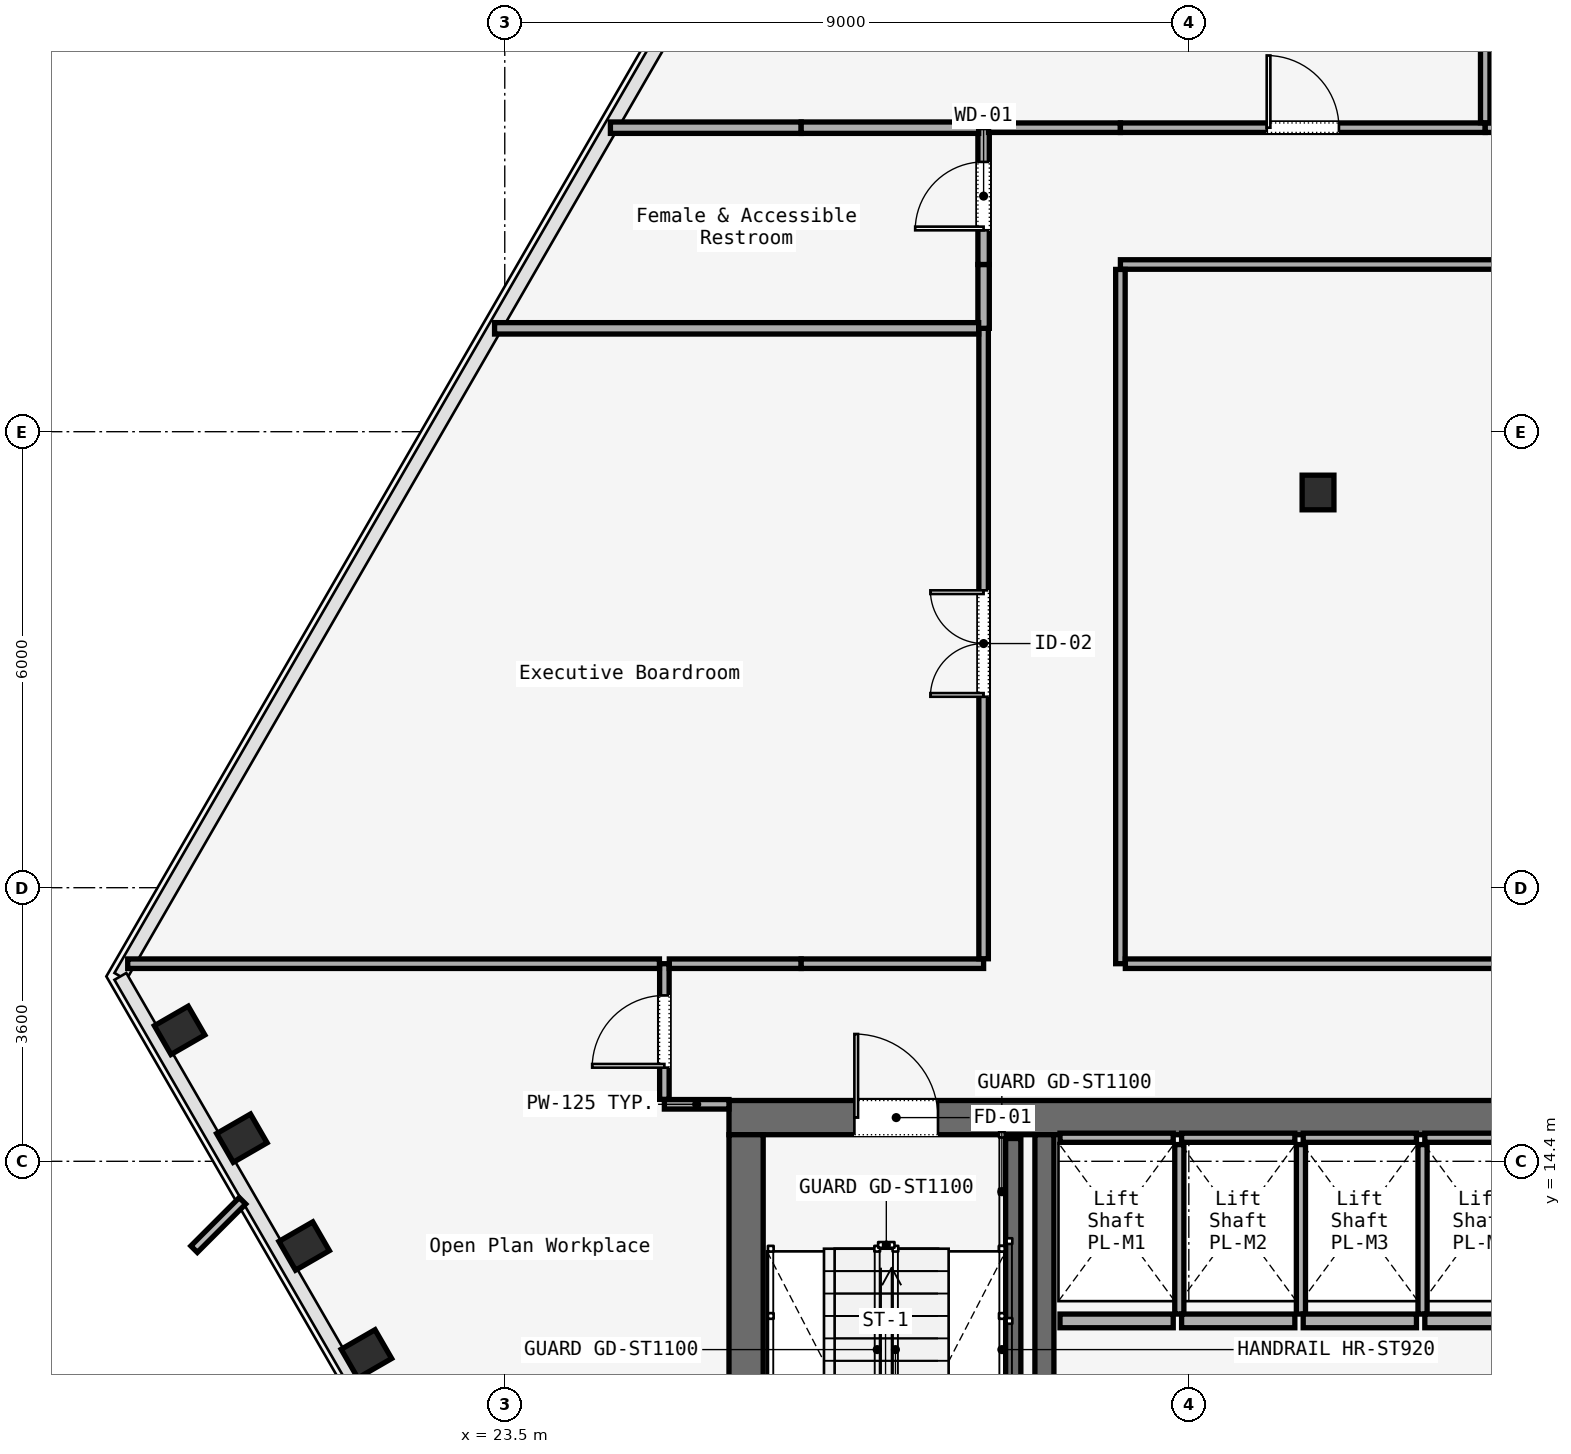
"""IFC4 building model, lengths in metres.
Left out: names, types, materials, properties, quantities, classifications, styles, units other than length and angle.
Written with IfcOpenShell. Run it as: python <this file> out.ifc"""

import sys

from ifc_helpers import new_model, si_unit, direction, frame, frame_2d, origin, origin_2d, place, context, subcontext, project, spatial, rectangle, i_section, extrude, element, fill, save


model = new_model("IFC4")
c1 = context("Model", 3, precision=1e-05, world=origin(), true_north=direction((0.0, 1.0)))
c2 = subcontext(c1, "Body", "Model", "MODEL_VIEW")
j1 = project(units=[si_unit("LENGTHUNIT", "METRE"), si_unit("PLANEANGLEUNIT", "RADIAN")], contexts=[c1])
p1 = place(None, origin())
s1 = spatial("IfcSite", under=j1, at=p1, CompositionType="ELEMENT")
p2 = place(p1, origin())
s2 = spatial("IfcBuilding", under=s1, at=p2, CompositionType="ELEMENT")
p3 = place(p2, frame((0.0, 0.0, 104.4)))
s3 = spatial("IfcBuildingStorey", under=s2, at=p3, CompositionType="ELEMENT", Elevation=104.4)
p4 = place(p3, frame((26.45, 14.975, 0.0), z_axis=(0.0, 0.0, 1.0), x_axis=(1.0, 0.0, 0.0)))
e1 = element("IfcWall", 1, at=p4, inside=s3, PredefinedType="SOLIDWALL", context=c2, shape_type="SweptSolid", body=[
    extrude(rectangle(XDim=31.1, YDim=0.45, at=frame_2d((15.55, 0.0))), origin(), (0.0, 0.0, 1.0), 3.58),
])
p5 = place(p4, frame((1.65, 0.0, 0.0)))
e2 = element("IfcOpeningElement", 2, at=p5, cuts=e1, PredefinedType="OPENING", context=c2, shape_type="SweptSolid", body=[
    extrude(rectangle(XDim=1.1, YDim=2.2, at=frame_2d((0.55, 1.1))), frame((0.0, 0.225, 0.0), z_axis=(0.0, -1.0, 0.0), x_axis=(1.0, 0.0, 0.0)), (0.0, 0.0, 1.0), 0.45),
])
p6 = place(p4, frame((13.65, 0.0, 0.0)))
e3 = element("IfcOpeningElement", 3, at=p6, cuts=e1, PredefinedType="OPENING", context=c2, shape_type="SweptSolid", body=[
    extrude(rectangle(XDim=1.1, YDim=2.2, at=frame_2d((0.55, 1.1))), frame((0.0, 0.225, 0.0), z_axis=(0.0, -1.0, 0.0), x_axis=(1.0, 0.0, 0.0)), (0.0, 0.0, 1.0), 0.45),
])
p7 = place(p4, frame((25.55, 0.0, 0.0)))
e4 = element("IfcOpeningElement", 4, at=p7, cuts=e1, PredefinedType="OPENING", context=c2, shape_type="SweptSolid", body=[
    extrude(rectangle(XDim=1.1, YDim=2.2, at=frame_2d((0.55, 1.1))), frame((0.0, 0.225, 0.0), z_axis=(0.0, -1.0, 0.0), x_axis=(1.0, 0.0, 0.0)), (0.0, 0.0, 1.0), 0.45),
])
p8 = place(p4, frame((10.7, 0.0, 0.0)))
e5 = element("IfcOpeningElement", 5, at=p8, cuts=e1, PredefinedType="OPENING", context=c2, shape_type="SweptSolid", body=[
    extrude(rectangle(XDim=1.4, YDim=2.2, at=frame_2d((0.7, 1.1))), frame((0.0, 0.225, 0.0), z_axis=(0.0, -1.0, 0.0), x_axis=(1.0, 0.0, 0.0)), (0.0, 0.0, 1.0), 0.45),
])
p9 = place(p4, frame((19.35, 0.0, 0.0)))
e6 = element("IfcOpeningElement", 6, at=p9, cuts=e1, PredefinedType="OPENING", context=c2, shape_type="SweptSolid", body=[
    extrude(rectangle(XDim=1.1, YDim=2.2, at=frame_2d((0.55, 1.1))), frame((0.0, 0.225, 0.0), z_axis=(0.0, -1.0, 0.0), x_axis=(1.0, 0.0, 0.0)), (0.0, 0.0, 1.0), 0.45),
])
p10 = place(p4, frame((21.4, 0.0, 0.0)))
e7 = element("IfcOpeningElement", 7, at=p10, cuts=e1, PredefinedType="OPENING", context=c2, shape_type="SweptSolid", body=[
    extrude(rectangle(XDim=0.9, YDim=2.1, at=frame_2d((0.45, 1.05))), frame((0.0, 0.225, 0.0), z_axis=(0.0, -1.0, 0.0), x_axis=(1.0, 0.0, 0.0)), (0.0, 0.0, 1.0), 0.45),
])
p11 = place(p4, frame((23.35, 0.0, 0.0)))
e8 = element("IfcOpeningElement", 8, at=p11, cuts=e1, PredefinedType="OPENING", context=c2, shape_type="SweptSolid", body=[
    extrude(rectangle(XDim=1.3, YDim=2.3, at=frame_2d((0.65, 1.15))), frame((0.0, 0.225, 0.0), z_axis=(0.0, -1.0, 0.0), x_axis=(1.0, 0.0, 0.0)), (0.0, 0.0, 1.0), 0.45),
])
p12 = place(p3, frame((26.675, 5.85, 0.0), z_axis=(0.0, 0.0, 1.0), x_axis=(0.0, 1.0, 0.0)))
e9 = element("IfcWall", 9, at=p12, inside=s3, PredefinedType="SOLIDWALL", context=c2, shape_type="SweptSolid", body=[
    extrude(rectangle(XDim=8.9, YDim=0.45, at=frame_2d((4.45, 0.0))), origin(), (0.0, 0.0, 1.0), 3.58),
])
p13 = place(p3, frame((30.6, 5.85, 0.0), z_axis=(0.0, 0.0, 1.0), x_axis=(0.0, 1.0, 0.0)))
e10 = element("IfcWall", 10, at=p13, inside=s3, PredefinedType="SOLIDWALL", context=c2, shape_type="SweptSolid", body=[
    extrude(rectangle(XDim=8.9, YDim=0.25, at=frame_2d((4.45, 0.0))), origin(), (0.0, 0.0, 1.0), 3.58),
])
p14 = place(p3, frame((34.2, 23.2, 0.0), z_axis=(0.0, 0.0, 1.0), x_axis=(1.0, 0.0, 0.0)))
e11 = element("IfcColumn", 11, at=p14, inside=s3, PredefinedType="COLUMN", context=c2, shape_type="SweptSolid", body=[
    extrude(i_section(OverallWidth=0.418, OverallDepth=0.456, WebThickness=0.042, FlangeThickness=0.067, FilletRadius=0.015, at=origin_2d()), origin(), (0.0, 0.0, 1.0), 3.58),
])
for number, where, z_axis, x_axis in (
    (12, (19.222, 16.123, 0.0), (0.0, 0.0, 1.0), (-0.5, 0.866, 0.0)),
    (13, (20.041, 14.704, 0.0), (0.0, 0.0, 1.0), (-0.5, 0.866, 0.0)),
    (14, (20.861, 13.285, 0.0), (0.0, 0.0, 1.0), (-0.5, 0.866, 0.0)),
    (15, (21.68, 11.866, 0.0), (0.0, 0.0, 1.0), (-0.5, 0.866, 0.0)),
):
    element("IfcColumn", number, at=place(p3, frame(where, z_axis=z_axis, x_axis=x_axis)), inside=s3, PredefinedType="COLUMN", context=c2, shape_type="SweptSolid", body=[
        extrude(i_section(OverallWidth=0.437, OverallDepth=0.514, WebThickness=0.061, FlangeThickness=0.077, FilletRadius=0.015, at=origin_2d()), origin(), (0.0, 0.0, 1.0), 3.58),
    ])
p15 = place(p3, frame((30.19, 14.7, 0.0), z_axis=(0.0, 0.0, 1.0), x_axis=(0.0, -1.0, 0.0)))
e16 = element("IfcWall", 16, at=p15, inside=s3, PredefinedType="SOLIDWALL", context=c2, shape_type="SweptSolid", body=[
    extrude(rectangle(XDim=7.65, YDim=0.2, at=frame_2d((3.825, 0.0))), origin(), (0.0, 0.0, 1.0), 3.8),
])
p16 = place(p3, frame((30.805, 12.3, 0.0), z_axis=(0.0, 0.0, 1.0), x_axis=(1.0, 0.0, 0.0)))
e17 = element("IfcWall", 17, at=p16, inside=s3, PredefinedType="SOLIDWALL", context=c2, shape_type="SweptSolid", body=[
    extrude(rectangle(XDim=1.49, YDim=0.18, at=frame_2d((0.745, 0.0))), origin(), (0.0, 0.0, 1.0), 2.95),
])
p17 = place(p3, frame((30.805, 14.71, 0.0), z_axis=(0.0, 0.0, 1.0), x_axis=(1.0, 0.0, 0.0)))
e18 = element("IfcWall", 18, at=p17, inside=s3, PredefinedType="SOLIDWALL", context=c2, shape_type="SweptSolid", body=[
    extrude(rectangle(XDim=1.49, YDim=0.12, at=frame_2d((0.745, 0.0))), origin(), (0.0, 0.0, 1.0), 2.95),
])
p18 = place(p3, frame((32.375, 12.39, 0.0), z_axis=(0.0, 0.0, 1.0), x_axis=(0.0, 1.0, 0.0)))
e19 = element("IfcWall", 19, at=p18, inside=s3, PredefinedType="SOLIDWALL", context=c2, shape_type="SweptSolid", body=[
    extrude(rectangle(XDim=2.23, YDim=0.12, at=frame_2d((1.115, 0.0))), origin(), (0.0, 0.0, 1.0), 2.95),
])
p19 = place(p3, frame((32.405, 12.3, 0.0), z_axis=(0.0, 0.0, 1.0), x_axis=(1.0, 0.0, 0.0)))
e20 = element("IfcWall", 20, at=p19, inside=s3, PredefinedType="SOLIDWALL", context=c2, shape_type="SweptSolid", body=[
    extrude(rectangle(XDim=1.49, YDim=0.18, at=frame_2d((0.745, 0.0))), origin(), (0.0, 0.0, 1.0), 2.95),
])
p20 = place(p3, frame((32.405, 14.71, 0.0), z_axis=(0.0, 0.0, 1.0), x_axis=(1.0, 0.0, 0.0)))
e21 = element("IfcWall", 21, at=p20, inside=s3, PredefinedType="SOLIDWALL", context=c2, shape_type="SweptSolid", body=[
    extrude(rectangle(XDim=1.49, YDim=0.12, at=frame_2d((0.745, 0.0))), origin(), (0.0, 0.0, 1.0), 2.95),
])
p21 = place(p3, frame((33.975, 12.39, 0.0), z_axis=(0.0, 0.0, 1.0), x_axis=(0.0, 1.0, 0.0)))
e22 = element("IfcWall", 22, at=p21, inside=s3, PredefinedType="SOLIDWALL", context=c2, shape_type="SweptSolid", body=[
    extrude(rectangle(XDim=2.23, YDim=0.12, at=frame_2d((1.115, 0.0))), origin(), (0.0, 0.0, 1.0), 2.95),
])
p22 = place(p3, frame((34.005, 12.3, 0.0), z_axis=(0.0, 0.0, 1.0), x_axis=(1.0, 0.0, 0.0)))
e23 = element("IfcWall", 23, at=p22, inside=s3, PredefinedType="SOLIDWALL", context=c2, shape_type="SweptSolid", body=[
    extrude(rectangle(XDim=1.49, YDim=0.18, at=frame_2d((0.745, 0.0))), origin(), (0.0, 0.0, 1.0), 2.95),
])
p23 = place(p3, frame((34.005, 14.71, 0.0), z_axis=(0.0, 0.0, 1.0), x_axis=(1.0, 0.0, 0.0)))
e24 = element("IfcWall", 24, at=p23, inside=s3, PredefinedType="SOLIDWALL", context=c2, shape_type="SweptSolid", body=[
    extrude(rectangle(XDim=1.49, YDim=0.12, at=frame_2d((0.745, 0.0))), origin(), (0.0, 0.0, 1.0), 2.95),
])
p24 = place(p3, frame((35.575, 12.39, 0.0), z_axis=(0.0, 0.0, 1.0), x_axis=(0.0, 1.0, 0.0)))
e25 = element("IfcWall", 25, at=p24, inside=s3, PredefinedType="SOLIDWALL", context=c2, shape_type="SweptSolid", body=[
    extrude(rectangle(XDim=2.23, YDim=0.12, at=frame_2d((1.115, 0.0))), origin(), (0.0, 0.0, 1.0), 2.95),
])
p25 = place(p3, frame((35.605, 12.3, 0.0), z_axis=(0.0, 0.0, 1.0), x_axis=(1.0, 0.0, 0.0)))
e26 = element("IfcWall", 26, at=p25, inside=s3, PredefinedType="SOLIDWALL", context=c2, shape_type="SweptSolid", body=[
    extrude(rectangle(XDim=1.49, YDim=0.18, at=frame_2d((0.745, 0.0))), origin(), (0.0, 0.0, 1.0), 2.95),
])
p26 = place(p3, frame((35.605, 14.71, 0.0), z_axis=(0.0, 0.0, 1.0), x_axis=(1.0, 0.0, 0.0)))
e27 = element("IfcWall", 27, at=p26, inside=s3, PredefinedType="SOLIDWALL", context=c2, shape_type="SweptSolid", body=[
    extrude(rectangle(XDim=1.49, YDim=0.12, at=frame_2d((0.745, 0.0))), origin(), (0.0, 0.0, 1.0), 2.95),
])
p27 = place(p3, frame((26.45, 15.15, 0.0), z_axis=(0.0, 0.0, 1.0), x_axis=(-1.0, 0.0, 0.0)))
e28 = element("IfcWall", 28, at=p27, inside=s3, PredefinedType="PARTITIONING", context=c2, shape_type="SweptSolid", body=[
    extrude(rectangle(XDim=0.85, YDim=0.125, at=frame_2d((0.425, 0.0))), origin(), (0.0, 0.0, 1.0), 2.95),
])
p28 = place(p3, frame((25.6, 15.215, 0.0), z_axis=(0.0, 0.0, 1.0), x_axis=(0.0, 1.0, 0.0)))
e29 = element("IfcWall", 29, at=p28, inside=s3, PredefinedType="PARTITIONING", context=c2, shape_type="SweptSolid", body=[
    extrude(rectangle(XDim=1.785, YDim=0.125, at=frame_2d((0.893, 0.0))), origin(), (0.0, 0.0, 1.0), 2.95),
])
p29 = place(p28, frame((0.417, 0.0, 0.0)))
e30 = element("IfcOpeningElement", 30, at=p29, cuts=e29, PredefinedType="OPENING", context=c2, shape_type="SweptSolid", body=[
    extrude(rectangle(XDim=0.95, YDim=2.2, at=frame_2d((0.475, 1.1))), frame((0.0, 0.062, 0.0), z_axis=(0.0, -1.0, 0.0), x_axis=(1.0, 0.0, 0.0)), (0.0, 0.0, 1.0), 0.125),
])
p30 = place(p3, frame((25.665, 17.0, 0.0), z_axis=(0.0, 0.0, 1.0), x_axis=(1.0, 0.0, 0.0)))
e31 = element("IfcWall", 31, at=p30, inside=s3, PredefinedType="PARTITIONING", context=c2, shape_type="SweptSolid", body=[
    extrude(rectangle(XDim=1.735, YDim=0.125, at=frame_2d((0.867, 0.0))), origin(), (0.0, 0.0, 1.0), 2.95),
])
p31 = place(p3, frame((27.4, 17.0, 0.0), z_axis=(0.0, 0.0, 1.0), x_axis=(1.0, 0.0, 0.0)))
e32 = element("IfcWall", 32, at=p31, inside=s3, PredefinedType="PARTITIONING", context=c2, shape_type="SweptSolid", body=[
    extrude(rectangle(XDim=2.4, YDim=0.125, at=frame_2d((1.2, 0.0))), origin(), (0.0, 0.0, 1.0), 2.95),
])
p32 = place(p3, frame((29.8, 17.065, 0.0), z_axis=(0.0, 0.0, 1.0), x_axis=(0.0, 1.0, 0.0)))
e33 = element("IfcWall", 33, at=p32, inside=s3, PredefinedType="PARTITIONING", context=c2, shape_type="SweptSolid", body=[
    extrude(rectangle(XDim=8.295, YDim=0.125, at=frame_2d((4.147, 0.0))), origin(), (0.0, 0.0, 1.0), 2.95),
])
p33 = place(p32, frame((3.448, 0.0, 0.0)))
e34 = element("IfcOpeningElement", 34, at=p33, cuts=e33, PredefinedType="OPENING", context=c2, shape_type="SweptSolid", body=[
    extrude(rectangle(XDim=1.4, YDim=2.2, at=frame_2d((0.7, 1.1))), frame((0.0, 0.062, 0.0), z_axis=(0.0, -1.0, 0.0), x_axis=(1.0, 0.0, 0.0)), (0.0, 0.0, 1.0), 0.125),
])
p34 = place(p3, frame((29.8, 25.36, 0.0), z_axis=(0.0, 0.0, 1.0), x_axis=(0.0, 1.0, 0.0)))
e35 = element("IfcWall", 35, at=p34, inside=s3, PredefinedType="PARTITIONING", context=c2, shape_type="SweptSolid", body=[
    extrude(rectangle(XDim=0.84, YDim=0.15, at=frame_2d((0.42, 0.0))), origin(), (0.0, 0.0, 1.0), 2.95),
])
p35 = place(p3, frame((29.8, 26.2, 0.0), z_axis=(0.0, 0.0, 1.0), x_axis=(0.0, 1.0, 0.0)))
e36 = element("IfcWall", 36, at=p35, inside=s3, PredefinedType="PARTITIONING", context=c2, shape_type="SweptSolid", body=[
    extrude(rectangle(XDim=1.8, YDim=0.15, at=frame_2d((0.9, 0.0))), origin(), (0.0, 0.0, 1.0), 2.95),
])
p36 = place(p35, frame((0.45, 0.0, 0.0)))
e37 = element("IfcOpeningElement", 37, at=p36, cuts=e36, PredefinedType="OPENING", context=c2, shape_type="SweptSolid", body=[
    extrude(rectangle(XDim=0.9, YDim=2.15, at=frame_2d((0.45, 1.075))), frame((0.0, 0.075, 0.0), z_axis=(0.0, -1.0, 0.0), x_axis=(1.0, 0.0, 0.0)), (0.0, 0.0, 1.0), 0.15),
])
p37 = place(p3, frame((29.865, 28.0, 0.0), z_axis=(0.0, 0.0, 1.0), x_axis=(1.0, 0.0, 0.0)))
e38 = element("IfcWall", 38, at=p37, inside=s3, PredefinedType="PARTITIONING", context=c2, shape_type="SweptSolid", body=[
    extrude(rectangle(XDim=1.735, YDim=0.125, at=frame_2d((0.868, 0.0))), origin(), (0.0, 0.0, 1.0), 2.95),
])
p38 = place(p3, frame((31.6, 28.0, 0.0), z_axis=(0.0, 0.0, 1.0), x_axis=(1.0, 0.0, 0.0)))
e39 = element("IfcWall", 39, at=p38, inside=s3, PredefinedType="PARTITIONING", context=c2, shape_type="SweptSolid", body=[
    extrude(rectangle(XDim=4.8, YDim=0.125, at=frame_2d((2.4, 0.0))), origin(), (0.0, 0.0, 1.0), 2.95),
])
p39 = place(p38, frame((1.925, 0.0, 0.0)))
e40 = element("IfcOpeningElement", 40, at=p39, cuts=e39, PredefinedType="OPENING", context=c2, shape_type="SweptSolid", body=[
    extrude(rectangle(XDim=0.95, YDim=2.2, at=frame_2d((0.475, 1.1))), frame((0.0, 0.062, 0.0), z_axis=(0.0, -1.0, 0.0), x_axis=(1.0, 0.0, 0.0)), (0.0, 0.0, 1.0), 0.125),
])
p40 = place(p3, frame((36.4, 28.0, 0.0), z_axis=(0.0, 0.0, 1.0), x_axis=(1.0, 0.0, 0.0)))
e41 = element("IfcWall", 41, at=p40, inside=s3, PredefinedType="PARTITIONING", context=c2, shape_type="SweptSolid", body=[
    extrude(rectangle(XDim=5.07, YDim=0.125, at=frame_2d((2.535, 0.0))), origin(), (0.0, 0.0, 1.0), 2.95),
])
p41 = place(p40, frame((2.06, 0.0, 0.0)))
e42 = element("IfcOpeningElement", 42, at=p41, cuts=e41, PredefinedType="OPENING", context=c2, shape_type="SweptSolid", body=[
    extrude(rectangle(XDim=0.95, YDim=2.2, at=frame_2d((0.475, 1.1))), frame((0.0, 0.062, 0.0), z_axis=(0.0, -1.0, 0.0), x_axis=(1.0, 0.0, 0.0)), (0.0, 0.0, 1.0), 0.125),
])
p42 = place(p3, frame((42.4, 26.2, 0.0), z_axis=(0.0, 0.0, 1.0), x_axis=(-1.0, 0.0, 0.0)))
e43 = element("IfcWall", 43, at=p42, inside=s3, PredefinedType="PARTITIONING", context=c2, shape_type="SweptSolid", body=[
    extrude(rectangle(XDim=10.8, YDim=0.125, at=frame_2d((5.4, 0.0))), origin(), (0.0, 0.0, 1.0), 2.95),
])
p43 = place(p42, frame((4.925, 0.0, 0.0)))
e44 = element("IfcOpeningElement", 44, at=p43, cuts=e43, PredefinedType="OPENING", context=c2, shape_type="SweptSolid", body=[
    extrude(rectangle(XDim=0.95, YDim=2.2, at=frame_2d((0.475, 1.1))), frame((0.0, 0.062, 0.0), z_axis=(0.0, -1.0, 0.0), x_axis=(1.0, 0.0, 0.0)), (0.0, 0.0, 1.0), 0.125),
])
p44 = place(p3, frame((31.6, 26.135, 0.0), z_axis=(0.0, 0.0, 1.0), x_axis=(0.0, -1.0, 0.0)))
e45 = element("IfcWall", 45, at=p44, inside=s3, PredefinedType="PARTITIONING", context=c2, shape_type="SweptSolid", body=[
    extrude(rectangle(XDim=9.135, YDim=0.125, at=frame_2d((4.567, 0.0))), origin(), (0.0, 0.0, 1.0), 2.95),
])
p45 = place(p3, frame((31.665, 17.0, 0.0), z_axis=(0.0, 0.0, 1.0), x_axis=(1.0, 0.0, 0.0)))
e46 = element("IfcWall", 46, at=p45, inside=s3, PredefinedType="PARTITIONING", context=c2, shape_type="SweptSolid", body=[
    extrude(rectangle(XDim=10.735, YDim=0.125, at=frame_2d((5.367, 0.0))), origin(), (0.0, 0.0, 1.0), 2.95),
])
p46 = place(p3, frame((18.539, 17.0, 0.0), z_axis=(0.0, 0.0, 1.0), x_axis=(1.0, 0.0, 0.0)))
e47 = element("IfcWall", 47, at=p46, inside=s3, PredefinedType="PARTITIONING", context=c2, shape_type="SweptSolid", body=[
    extrude(rectangle(XDim=6.996, YDim=0.125, at=frame_2d((3.498, 0.0))), origin(), (0.0, 0.0, 1.0), 2.95),
])
p47 = place(p3, frame((23.366, 25.36, 0.0), z_axis=(0.0, 0.0, 1.0), x_axis=(1.0, 0.0, 0.0)))
e48 = element("IfcWall", 48, at=p47, inside=s3, PredefinedType="PARTITIONING", context=c2, shape_type="SweptSolid", body=[
    extrude(rectangle(XDim=6.369, YDim=0.15, at=frame_2d((3.185, 0.0))), origin(), (0.0, 0.0, 1.0), 2.95),
])
p48 = place(p3, frame((24.89, 28.0, 0.0), z_axis=(0.0, 0.0, 1.0), x_axis=(1.0, 0.0, 0.0)))
e49 = element("IfcWall", 49, at=p48, inside=s3, PredefinedType="PARTITIONING", context=c2, shape_type="SweptSolid", body=[
    extrude(rectangle(XDim=2.51, YDim=0.15, at=frame_2d((1.255, 0.0))), origin(), (0.0, 0.0, 1.0), 2.95),
])
p49 = place(p3, frame((27.4, 28.0, 0.0), z_axis=(0.0, 0.0, 1.0), x_axis=(1.0, 0.0, 0.0)))
e50 = element("IfcWall", 50, at=p49, inside=s3, PredefinedType="PARTITIONING", context=c2, shape_type="SweptSolid", body=[
    extrude(rectangle(XDim=2.335, YDim=0.15, at=frame_2d((1.167, 0.0))), origin(), (0.0, 0.0, 1.0), 2.95),
])
p50 = place(p3, frame((36.4, 45.963, 0.0), z_axis=(0.0, 0.0, 1.0), x_axis=(0.0, -1.0, 0.0)))
e51 = element("IfcWall", 51, at=p50, inside=s3, PredefinedType="PARTITIONING", context=c2, shape_type="SweptSolid", body=[
    extrude(rectangle(XDim=17.898, YDim=0.125, at=frame_2d((8.949, 0.0))), origin(), (0.0, 0.0, 1.0), 2.95),
])
p51 = place(p5, origin())
e52 = element("IfcDoor", 52, at=p51, inside=s3, OperationType="SINGLE_SWING_LEFT", PredefinedType="DOOR", context=c2, shape_type="SweptSolid", body=[
    extrude(rectangle(XDim=1.1, YDim=2.2, at=frame_2d((0.55, 1.1))), frame((0.0, 0.025, 0.0), z_axis=(0.0, -1.0, 0.0), x_axis=(1.0, 0.0, 0.0)), (0.0, 0.0, 1.0), 0.05),
])
fill(e2, e52)
p52 = place(p29, origin())
e53 = element("IfcDoor", 53, at=p52, inside=s3, OperationType="SINGLE_SWING_LEFT", PredefinedType="DOOR", context=c2, shape_type="SweptSolid", body=[
    extrude(rectangle(XDim=0.95, YDim=2.2, at=frame_2d((0.475, 1.1))), frame((0.0, 0.025, 0.0), z_axis=(0.0, -1.0, 0.0), x_axis=(1.0, 0.0, 0.0)), (0.0, 0.0, 1.0), 0.05),
])
fill(e30, e53)
p53 = place(p33, origin())
e54 = element("IfcDoor", 54, at=p53, inside=s3, OperationType="SINGLE_SWING_LEFT", PredefinedType="DOOR", context=c2, shape_type="SweptSolid", body=[
    extrude(rectangle(XDim=1.4, YDim=2.2, at=frame_2d((0.7, 1.1))), frame((0.0, 0.025, 0.0), z_axis=(0.0, -1.0, 0.0), x_axis=(1.0, 0.0, 0.0)), (0.0, 0.0, 1.0), 0.05),
])
fill(e34, e54)
p54 = place(p36, origin())
e55 = element("IfcDoor", 55, at=p54, inside=s3, OperationType="SINGLE_SWING_RIGHT", PredefinedType="DOOR", context=c2, shape_type="SweptSolid", body=[
    extrude(rectangle(XDim=0.9, YDim=2.15, at=frame_2d((0.45, 1.075))), frame((0.0, 0.025, 0.0), z_axis=(0.0, -1.0, 0.0), x_axis=(1.0, 0.0, 0.0)), (0.0, 0.0, 1.0), 0.05),
])
fill(e37, e55)
p55 = place(p39, origin())
e56 = element("IfcDoor", 56, at=p55, inside=s3, OperationType="SINGLE_SWING_RIGHT", PredefinedType="DOOR", context=c2, shape_type="SweptSolid", body=[
    extrude(rectangle(XDim=0.95, YDim=2.2, at=frame_2d((0.475, 1.1))), frame((0.0, 0.025, 0.0), z_axis=(0.0, -1.0, 0.0), x_axis=(1.0, 0.0, 0.0)), (0.0, 0.0, 1.0), 0.05),
])
fill(e40, e56)
save(model, sys.argv[1])
